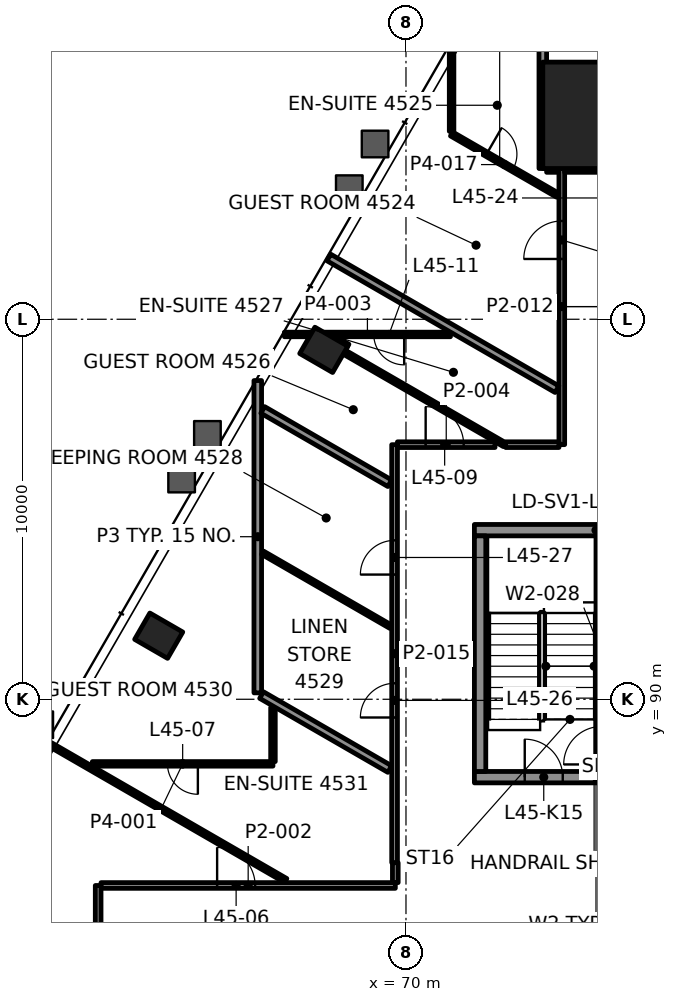
"""IFC4 building model, lengths in metres.
Left out: names, types, materials, properties, quantities, classifications, styles, units other than length and angle.
Written with IfcOpenShell. Run it as: python <this file> out.ifc"""

import sys

from ifc_helpers import new_model, si_unit, direction, frame, frame_2d, origin, origin_2d, place, context, subcontext, project, spatial, rectangle, hollow_rectangle, extrude, element, fill, save


model = new_model("IFC4")
c1 = context("Model", 3, precision=1e-05, world=origin(), true_north=direction((0.0, 1.0)))
c2 = subcontext(c1, "Body", "Model", "MODEL_VIEW")
j1 = project(units=[si_unit("LENGTHUNIT", "METRE"), si_unit("PLANEANGLEUNIT", "RADIAN")], contexts=[c1])
p1 = place(None, origin())
s1 = spatial("IfcSite", under=j1, at=p1, CompositionType="ELEMENT")
p2 = place(p1, origin())
s2 = spatial("IfcBuilding", under=s1, at=p2, CompositionType="ELEMENT")
p3 = place(p2, frame((0.0, 0.0, 194.8)))
s3 = spatial("IfcBuildingStorey", under=s2, at=p3, CompositionType="ELEMENT", Elevation=194.8)
p4 = place(p3, frame((75.0, 105.367, 0.0), z_axis=(0.0, 0.0, 1.0), x_axis=(-1.0, 0.0, 0.0)))
e1 = element("IfcColumn", 1, at=p4, inside=s3, PredefinedType="COLUMN", context=c2, shape_type="SweptSolid", body=[
    extrude(rectangle(XDim=2.8, YDim=2.8, at=origin_2d()), origin(), (0.0, 0.0, 1.0), 3.9),
])
for number, where, z_axis, x_axis in (
    (2, (67.836, 99.195, -0.0), (0.0, 0.0, 1.0), (-0.5, -0.866, 0.0)),
    (3, (63.494, 91.673, -0.0), (0.0, 0.0, 1.0), (-0.5, -0.866, 0.0)),
):
    element("IfcColumn", number, at=place(p3, frame(where, z_axis=z_axis, x_axis=x_axis)), inside=s3, PredefinedType="COLUMN", context=c2, shape_type="SweptSolid", body=[
        extrude(hollow_rectangle(XDim=0.8, YDim=1.0, WallThickness=0.05, at=origin_2d()), origin(), (0.0, 0.0, 1.0), 3.9),
    ])
p5 = place(p3, frame((71.8, 87.95, 0.0), z_axis=(0.0, 0.0, 1.0), x_axis=(1.0, 0.0, 0.0)))
e4 = element("IfcWall", 4, at=p5, inside=s3, PredefinedType="SHEAR", context=c2, shape_type="SweptSolid", body=[
    extrude(rectangle(XDim=6.4, YDim=0.3, at=frame_2d((3.2, 0.0))), origin(), (0.0, 0.0, 1.0), 3.7),
])
p6 = place(p5, frame((1.325, 0.0, 0.0)))
e5 = element("IfcOpeningElement", 5, at=p6, cuts=e4, PredefinedType="OPENING", context=c2, shape_type="SweptSolid", body=[
    extrude(rectangle(XDim=1.0, YDim=2.1, at=frame_2d((0.5, 1.05))), frame((0.0, 0.16, 0.0), z_axis=(0.0, -1.0, 0.0), x_axis=(1.0, 0.0, 0.0)), (0.0, 0.0, 1.0), 0.32),
])
p7 = place(p5, frame((4.125, 0.0, 0.0)))
e6 = element("IfcOpeningElement", 6, at=p7, cuts=e4, PredefinedType="OPENING", context=c2, shape_type="SweptSolid", body=[
    extrude(rectangle(XDim=1.2, YDim=2.1, at=frame_2d((0.6, 1.05))), frame((0.0, 0.16, 0.0), z_axis=(0.0, -1.0, 0.0), x_axis=(1.0, 0.0, 0.0)), (0.0, 0.0, 1.0), 0.32),
])
p8 = place(p3, frame((71.8, 94.45, 0.0), z_axis=(0.0, 0.0, 1.0), x_axis=(1.0, 0.0, 0.0)))
e7 = element("IfcWall", 7, at=p8, inside=s3, PredefinedType="SHEAR", context=c2, shape_type="SweptSolid", body=[
    extrude(rectangle(XDim=6.4, YDim=0.3, at=frame_2d((3.2, 0.0))), origin(), (0.0, 0.0, 1.0), 3.7),
])
p9 = place(p3, frame((71.95, 88.1, 0.0), z_axis=(0.0, 0.0, 1.0), x_axis=(0.0, 1.0, 0.0)))
e8 = element("IfcWall", 8, at=p9, inside=s3, PredefinedType="SHEAR", context=c2, shape_type="SweptSolid", body=[
    extrude(rectangle(XDim=6.2, YDim=0.3, at=frame_2d((3.1, 0.0))), origin(), (0.0, 0.0, 1.0), 3.7),
])
p10 = place(p3, frame((75.15, 88.1, 0.0), z_axis=(0.0, 0.0, 1.0), x_axis=(0.0, 1.0, 0.0)))
e9 = element("IfcWall", 9, at=p10, inside=s3, PredefinedType="SHEAR", context=c2, shape_type="SweptSolid", body=[
    extrude(rectangle(XDim=6.2, YDim=0.3, at=frame_2d((3.1, 0.0))), origin(), (0.0, 0.0, 1.0), 3.7),
])
p11 = place(p10, frame((0.185, 0.0, 0.0)))
e10 = element("IfcOpeningElement", 10, at=p11, cuts=e9, PredefinedType="OPENING", context=c2, shape_type="SweptSolid", body=[
    extrude(rectangle(XDim=1.0, YDim=2.1, at=frame_2d((0.5, 1.05))), frame((0.0, 0.16, 0.0), z_axis=(0.0, -1.0, 0.0), x_axis=(1.0, 0.0, 0.0)), (0.0, 0.0, 1.0), 0.32),
])
p12 = place(p3, frame((61.976, 85.1, 0.0), z_axis=(0.0, 0.0, 1.0), x_axis=(1.0, 0.0, 0.0)))
e11 = element("IfcWall", 11, at=p12, inside=s3, PredefinedType="PARTITIONING", context=c2, shape_type="SweptSolid", body=[
    extrude(rectangle(XDim=7.744, YDim=0.15, at=frame_2d((3.872, 0.0))), origin(), (0.0, 0.0, 1.0), 3.1),
])
p13 = place(p12, frame((3.055, 0.0, 0.0)))
e12 = element("IfcOpeningElement", 12, at=p13, cuts=e11, PredefinedType="OPENING", context=c2, shape_type="SweptSolid", body=[
    extrude(rectangle(XDim=1.0, YDim=2.1, at=frame_2d((0.5, 1.05))), frame((0.0, 0.085, 0.0), z_axis=(0.0, -1.0, 0.0), x_axis=(1.0, 0.0, 0.0)), (0.0, 0.0, 1.0), 0.17),
])
p14 = place(p3, frame((66.5, 88.3, 0.0), z_axis=(0.0, 0.0, 1.0), x_axis=(-1.0, 0.0, 0.0)))
e13 = element("IfcWall", 13, at=p14, inside=s3, PredefinedType="PARTITIONING", context=c2, shape_type="SweptSolid", body=[
    extrude(rectangle(XDim=4.751, YDim=0.12, at=frame_2d((2.376, 0.0))), origin(), (0.0, 0.0, 1.0), 3.097),
])
p15 = place(p14, frame((1.976, 0.0, 0.0)))
e14 = element("IfcOpeningElement", 14, at=p15, cuts=e13, PredefinedType="OPENING", context=c2, shape_type="SweptSolid", body=[
    extrude(rectangle(XDim=0.8, YDim=2.1, at=frame_2d((0.4, 1.05))), frame((0.0, 0.07, 0.0), z_axis=(0.0, -1.0, 0.0), x_axis=(1.0, 0.0, 0.0)), (0.0, 0.0, 1.0), 0.14),
])
p16 = place(p3, frame((69.775, 96.7, 0.0), z_axis=(0.0, 0.0, 1.0), x_axis=(1.0, 0.0, 0.0)))
e15 = element("IfcWall", 15, at=p16, inside=s3, PredefinedType="PARTITIONING", context=c2, shape_type="SweptSolid", body=[
    extrude(rectangle(XDim=2.567, YDim=0.15, at=frame_2d((1.284, 0.0))), origin(), (0.0, 0.0, 1.0), 3.1),
])
p17 = place(p16, frame((0.742, 0.0, 0.0)))
e16 = element("IfcOpeningElement", 16, at=p17, cuts=e15, PredefinedType="OPENING", context=c2, shape_type="SweptSolid", body=[
    extrude(rectangle(XDim=1.0, YDim=2.1, at=frame_2d((0.5, 1.05))), frame((0.0, 0.085, 0.0), z_axis=(0.0, -1.0, 0.0), x_axis=(1.0, 0.0, 0.0)), (0.0, 0.0, 1.0), 0.17),
])
p18 = place(p3, frame((71.17, 99.6, 0.0), z_axis=(0.0, 0.0, 1.0), x_axis=(-1.0, 0.0, 0.0)))
e17 = element("IfcWall", 17, at=p18, inside=s3, PredefinedType="PARTITIONING", context=c2, shape_type="SweptSolid", body=[
    extrude(rectangle(XDim=4.37, YDim=0.12, at=frame_2d((2.185, 0.0))), origin(), (0.0, 0.0, 1.0), 3.1),
])
p19 = place(p18, frame((1.218, 0.0, 0.0)))
e18 = element("IfcOpeningElement", 18, at=p19, cuts=e17, PredefinedType="OPENING", context=c2, shape_type="SweptSolid", body=[
    extrude(rectangle(XDim=0.8, YDim=2.1, at=frame_2d((0.4, 1.05))), frame((0.0, 0.07, 0.0), z_axis=(0.0, -1.0, 0.0), x_axis=(1.0, 0.0, 0.0)), (0.0, 0.0, 1.0), 0.14),
])
p20 = place(p3, frame((73.7, 103.967, 0.0), z_axis=(0.0, 0.0, 1.0), x_axis=(1.0, 0.0, 0.0)))
e19 = element("IfcWall", 19, at=p20, inside=s3, PredefinedType="PARTITIONING", context=c2, shape_type="SweptSolid", body=[
    extrude(rectangle(XDim=0.324, YDim=0.2, at=frame_2d((0.162, 0.0))), origin(), (0.0, 0.0, 1.0), 3.1),
])
p21 = place(p3, frame((74.1, 96.7, 0.0), z_axis=(0.0, 0.0, 1.0), x_axis=(0.0, 1.0, 0.0)))
e20 = element("IfcWall", 20, at=p21, inside=s3, PredefinedType="PARTITIONING", context=c2, shape_type="SweptSolid", body=[
    extrude(rectangle(XDim=7.267, YDim=0.15, at=frame_2d((3.633, 0.0))), origin(), (0.0, 0.0, 1.0), 3.1),
])
p22 = place(p21, frame((4.886, 0.0, 0.0)))
e21 = element("IfcOpeningElement", 21, at=p22, cuts=e20, PredefinedType="OPENING", context=c2, shape_type="SweptSolid", body=[
    extrude(rectangle(XDim=1.0, YDim=2.1, at=frame_2d((0.5, 1.05))), frame((0.0, 0.085, 0.0), z_axis=(0.0, -1.0, 0.0), x_axis=(1.0, 0.0, 0.0)), (0.0, 0.0, 1.0), 0.17),
])
p23 = place(p3, frame((73.6, 103.967, 0.0), z_axis=(0.0, 0.0, 1.0), x_axis=(0.0, 1.0, 0.0)))
e22 = element("IfcWall", 22, at=p23, inside=s3, PredefinedType="PARTITIONING", context=c2, shape_type="SweptSolid", body=[
    extrude(rectangle(XDim=3.26, YDim=0.2, at=frame_2d((1.63, 0.0))), origin(), (0.0, 0.0, 1.0), 3.1),
])
p24 = place(p3, frame((71.2, 104.945, 0.0), z_axis=(0.0, 0.0, 1.0), x_axis=(0.0, 1.0, 0.0)))
e23 = element("IfcWall", 23, at=p24, inside=s3, PredefinedType="PARTITIONING", context=c2, shape_type="SweptSolid", body=[
    extrude(rectangle(XDim=2.252, YDim=0.12, at=frame_2d((1.126, 0.0))), origin(), (0.0, 0.0, 1.0), 3.1),
])
p25 = place(p3, frame((69.719, 85.175, 0.0), z_axis=(0.0, 0.0, 1.0), x_axis=(0.0, 1.0, 0.0)))
e24 = element("IfcWall", 24, at=p25, inside=s3, PredefinedType="PARTITIONING", context=c2, shape_type="SweptSolid", body=[
    extrude(rectangle(XDim=0.525, YDim=0.15, at=frame_2d((0.262, 0.0))), origin(), (0.0, 0.0, 1.0), 3.1),
])
p26 = place(p3, frame((69.7, 85.7, 0.0), z_axis=(0.0, 0.0, 1.0), x_axis=(0.0, 1.0, 0.0)))
e25 = element("IfcWall", 25, at=p26, inside=s3, PredefinedType="PARTITIONING", context=c2, shape_type="SweptSolid", body=[
    extrude(rectangle(XDim=10.999, YDim=0.15, at=frame_2d((5.5, 0.0))), origin(), (0.0, 0.0, 1.0), 3.097),
])
p27 = place(p26, frame((3.82, 0.0, 0.0)))
e26 = element("IfcOpeningElement", 26, at=p27, cuts=e25, PredefinedType="OPENING", context=c2, shape_type="SweptSolid", body=[
    extrude(rectangle(XDim=0.9, YDim=2.1, at=frame_2d((0.45, 1.05))), frame((0.0, 0.085, 0.0), z_axis=(0.0, -1.0, 0.0), x_axis=(1.0, 0.0, 0.0)), (0.0, 0.0, 1.0), 0.17),
])
p28 = place(p26, frame((7.581, 0.0, 0.0)))
e27 = element("IfcOpeningElement", 27, at=p28, cuts=e25, PredefinedType="OPENING", context=c2, shape_type="SweptSolid", body=[
    extrude(rectangle(XDim=0.9, YDim=2.1, at=frame_2d((0.45, 1.05))), frame((0.0, 0.085, 0.0), z_axis=(0.0, -1.0, 0.0), x_axis=(1.0, 0.0, 0.0)), (0.0, 0.0, 1.0), 0.17),
])
p29 = place(p3, frame((66.5, 88.361, 0.0), z_axis=(0.0, 0.0, 1.0), x_axis=(0.0, 1.0, 0.0)))
e28 = element("IfcWall", 28, at=p29, inside=s3, PredefinedType="PARTITIONING", context=c2, shape_type="SweptSolid", body=[
    extrude(rectangle(XDim=1.421, YDim=0.12, at=frame_2d((0.71, 0.0))), origin(), (0.0, 0.0, 1.0), 3.1),
])
p30 = place(p3, frame((66.1, 90.169, 0.0), z_axis=(0.0, 0.0, 1.0), x_axis=(0.0, 1.0, 0.0)))
e29 = element("IfcWall", 29, at=p30, inside=s3, PredefinedType="PARTITIONING", context=c2, shape_type="SweptSolid", body=[
    extrude(rectangle(XDim=8.218, YDim=0.2, at=frame_2d((4.109, 0.0))), origin(), (0.0, 0.0, 1.0), 3.022),
])
p31 = place(p3, frame((61.9, 68.476, 0.0), z_axis=(0.0, 0.0, 1.0), x_axis=(0.0, 1.0, 0.0)))
e30 = element("IfcWall", 30, at=p31, inside=s3, PredefinedType="PARTITIONING", context=c2, shape_type="SweptSolid", body=[
    extrude(rectangle(XDim=16.624, YDim=0.15, at=frame_2d((8.312, 0.0))), origin(), (0.0, 0.0, 1.0), 3.1),
])
p32 = place(p31, frame((8.276, 0.0, 0.0)))
e31 = element("IfcOpeningElement", 31, at=p32, cuts=e30, PredefinedType="OPENING", context=c2, shape_type="SweptSolid", body=[
    extrude(rectangle(XDim=1.0, YDim=2.1, at=frame_2d((0.5, 1.05))), frame((0.0, 0.085, 0.0), z_axis=(0.0, -1.0, 0.0), x_axis=(1.0, 0.0, 0.0)), (0.0, 0.0, 1.0), 0.17),
])
p33 = place(p3, frame((71.2, 104.876, 0.0), z_axis=(0.0, 0.0, 1.0), x_axis=(0.866029130051, -0.499993545862, 0.0)))
e32 = element("IfcWall", 32, at=p33, inside=s3, PredefinedType="PARTITIONING", context=c2, shape_type="SweptSolid", body=[
    extrude(rectangle(XDim=3.222, YDim=0.12, at=frame_2d((1.611, 0.0))), origin(), (0.0, 0.0, 1.0), 3.1),
])
p34 = place(p33, frame((1.061, 0.0, 0.0)))
e33 = element("IfcOpeningElement", 33, at=p34, cuts=e32, PredefinedType="OPENING", context=c2, shape_type="SweptSolid", body=[
    extrude(rectangle(XDim=0.8, YDim=2.1, at=frame_2d((0.4, 1.05))), frame((0.0, 0.07, 0.0), z_axis=(0.0, -1.0, 0.0), x_axis=(1.0, 0.0, 0.0)), (0.0, 0.0, 1.0), 0.14),
])
p35 = place(p3, frame((73.973, 98.159, 0.0), z_axis=(0.0, 0.0, 1.0), x_axis=(-0.866026061359, 0.499998861046, 0.0)))
e34 = element("IfcWall", 34, at=p35, inside=s3, PredefinedType="PARTITIONING", context=c2, shape_type="SweptSolid", body=[
    extrude(rectangle(XDim=6.932, YDim=0.2, at=frame_2d((3.466, 0.0))), origin(), (0.0, 0.0, 1.0), 3.1),
])
p36 = place(p3, frame((68.469, 99.291, 0.0), z_axis=(0.0, 0.0, 1.0), x_axis=(-0.865986299303, 0.500067724834, 0.0)))
e35 = element("IfcWall", 35, at=p36, inside=s3, PredefinedType="PARTITIONING", context=c2, shape_type="SweptSolid", body=[
    extrude(rectangle(XDim=0.388, YDim=0.12, at=frame_2d((0.194, 0.0))), origin(), (0.0, 0.0, 1.0), 3.1),
])
p37 = place(p3, frame((72.592, 96.7, 0.0), z_axis=(0.0, 0.0, 1.0), x_axis=(-0.866036013313, 0.499981623307, 0.0)))
e36 = element("IfcWall", 36, at=p37, inside=s3, PredefinedType="PARTITIONING", context=c2, shape_type="SweptSolid", body=[
    extrude(rectangle(XDim=4.865, YDim=0.12, at=frame_2d((2.433, 0.0))), origin(), (0.0, 0.0, 1.0), 3.1),
])
p38 = place(p3, frame((69.573, 95.685, 0.0), z_axis=(0.0, 0.0, 1.0), x_axis=(-0.8660191159, 0.500010890777, 0.0)))
e37 = element("IfcWall", 37, at=p38, inside=s3, PredefinedType="PARTITIONING", context=c2, shape_type="SweptSolid", body=[
    extrude(rectangle(XDim=3.859, YDim=0.2, at=frame_2d((1.929, 0.0))), origin(), (0.0, 0.0, 1.0), 3.022),
])
p39 = place(p3, frame((69.599, 91.909, 0.0), z_axis=(0.0, 0.0, 1.0), x_axis=(-0.866016482536, 0.500015451737, 0.0)))
e38 = element("IfcWall", 38, at=p39, inside=s3, PredefinedType="PARTITIONING", context=c2, shape_type="SweptSolid", body=[
    extrude(rectangle(XDim=3.895, YDim=0.1, at=frame_2d((1.948, 0.0))), origin(), (0.0, 0.0, 1.0), 3.1),
])
p40 = place(p3, frame((69.573, 88.163, 0.0), z_axis=(0.0, 0.0, 1.0), x_axis=(-0.866043624834, 0.499968438888, 0.0)))
e39 = element("IfcWall", 39, at=p40, inside=s3, PredefinedType="PARTITIONING", context=c2, shape_type="SweptSolid", body=[
    extrude(rectangle(XDim=3.895, YDim=0.2, at=frame_2d((1.947, 0.0))), origin(), (0.0, 0.0, 1.0), 3.1),
])
p41 = place(p3, frame((66.835, 85.23, 0.0), z_axis=(0.0, 0.0, 1.0), x_axis=(-0.866029508188, 0.499992890897, 0.0)))
e40 = element("IfcWall", 40, at=p41, inside=s3, PredefinedType="PARTITIONING", context=c2, shape_type="SweptSolid", body=[
    extrude(rectangle(XDim=7.215, YDim=0.12, at=frame_2d((3.608, 0.0))), origin(), (0.0, 0.0, 1.0), 3.022),
])
p42 = place(p3, frame((72.622, 96.7, 0.0), z_axis=(0.0, 0.0, 1.0), x_axis=(1.0, 0.0, 0.0)))
e41 = element("IfcWall", 41, at=p42, inside=s3, PredefinedType="PARTITIONING", context=c2, shape_type="SweptSolid", body=[
    extrude(rectangle(XDim=1.403, YDim=0.15, at=frame_2d((0.701, 0.0))), origin(), (0.0, 0.0, 1.0), 3.1),
])
p43 = place(p3, frame((74.175, 103.967, 0.0), z_axis=(0.0, 0.0, 1.0), x_axis=(1.0, 0.0, 0.0)))
e42 = element("IfcWall", 42, at=p43, inside=s3, PredefinedType="PARTITIONING", context=c2, shape_type="SweptSolid", body=[
    extrude(rectangle(XDim=1.649, YDim=0.2, at=frame_2d((0.825, 0.0))), origin(), (0.0, 0.0, 1.0), 3.097),
])
p44 = place(p13, origin())
e43 = element("IfcDoor", 43, at=p44, inside=s3, OperationType="SINGLE_SWING_LEFT", PredefinedType="DOOR", context=c2, shape_type="SweptSolid", body=[
    extrude(rectangle(XDim=1.0, YDim=2.1, at=frame_2d((0.5, 1.05))), frame((0.0, 0.025, 0.0), z_axis=(0.0, -1.0, 0.0), x_axis=(1.0, 0.0, 0.0)), (0.0, 0.0, 1.0), 0.05),
])
fill(e12, e43)
p45 = place(p15, origin())
e44 = element("IfcDoor", 44, at=p45, inside=s3, OperationType="SINGLE_SWING_LEFT", PredefinedType="DOOR", context=c2, shape_type="SweptSolid", body=[
    extrude(rectangle(XDim=0.8, YDim=2.1, at=frame_2d((0.4, 1.05))), frame((0.0, 0.025, 0.0), z_axis=(0.0, -1.0, 0.0), x_axis=(1.0, 0.0, 0.0)), (0.0, 0.0, 1.0), 0.05),
])
fill(e14, e44)
p46 = place(p17, origin())
e45 = element("IfcDoor", 45, at=p46, inside=s3, OperationType="SINGLE_SWING_LEFT", PredefinedType="DOOR", context=c2, shape_type="SweptSolid", body=[
    extrude(rectangle(XDim=1.0, YDim=2.1, at=frame_2d((0.5, 1.05))), frame((0.0, 0.025, 0.0), z_axis=(0.0, -1.0, 0.0), x_axis=(1.0, 0.0, 0.0)), (0.0, 0.0, 1.0), 0.05),
])
fill(e16, e45)
p47 = place(p19, origin())
e46 = element("IfcDoor", 46, at=p47, inside=s3, OperationType="SINGLE_SWING_LEFT", PredefinedType="DOOR", context=c2, shape_type="SweptSolid", body=[
    extrude(rectangle(XDim=0.8, YDim=2.1, at=frame_2d((0.4, 1.05))), frame((0.0, 0.025, 0.0), z_axis=(0.0, -1.0, 0.0), x_axis=(1.0, 0.0, 0.0)), (0.0, 0.0, 1.0), 0.05),
])
fill(e18, e46)
p48 = place(p22, origin())
e47 = element("IfcDoor", 47, at=p48, inside=s3, OperationType="SINGLE_SWING_LEFT", PredefinedType="DOOR", context=c2, shape_type="SweptSolid", body=[
    extrude(rectangle(XDim=1.0, YDim=2.1, at=frame_2d((0.5, 1.05))), frame((0.0, 0.025, 0.0), z_axis=(0.0, -1.0, 0.0), x_axis=(1.0, 0.0, 0.0)), (0.0, 0.0, 1.0), 0.05),
])
fill(e21, e47)
p49 = place(p27, origin())
e48 = element("IfcDoor", 48, at=p49, inside=s3, OperationType="SINGLE_SWING_RIGHT", PredefinedType="DOOR", context=c2, shape_type="SweptSolid", body=[
    extrude(rectangle(XDim=0.9, YDim=2.1, at=frame_2d((0.45, 1.05))), frame((0.0, 0.025, 0.0), z_axis=(0.0, -1.0, 0.0), x_axis=(1.0, 0.0, 0.0)), (0.0, 0.0, 1.0), 0.05),
])
fill(e26, e48)
p50 = place(p28, origin())
e49 = element("IfcDoor", 49, at=p50, inside=s3, OperationType="SINGLE_SWING_LEFT", PredefinedType="DOOR", context=c2, shape_type="SweptSolid", body=[
    extrude(rectangle(XDim=0.9, YDim=2.1, at=frame_2d((0.45, 1.05))), frame((0.0, 0.025, 0.0), z_axis=(0.0, -1.0, 0.0), x_axis=(1.0, 0.0, 0.0)), (0.0, 0.0, 1.0), 0.05),
])
fill(e27, e49)
p51 = place(p34, origin())
e50 = element("IfcDoor", 50, at=p51, inside=s3, OperationType="SINGLE_SWING_LEFT", PredefinedType="DOOR", context=c2, shape_type="SweptSolid", body=[
    extrude(rectangle(XDim=0.8, YDim=2.1, at=frame_2d((0.4, 1.05))), frame((0.0, 0.025, 0.0), z_axis=(0.0, -1.0, 0.0), x_axis=(1.0, 0.0, 0.0)), (0.0, 0.0, 1.0), 0.05),
])
fill(e33, e50)
p52 = place(p6, origin())
e51 = element("IfcDoor", 51, at=p52, inside=s3, OperationType="SINGLE_SWING_RIGHT", PredefinedType="DOOR", context=c2, shape_type="SweptSolid", body=[
    extrude(rectangle(XDim=1.0, YDim=2.1, at=frame_2d((0.5, 1.05))), frame((0.0, 0.025, 0.0), z_axis=(0.0, -1.0, 0.0), x_axis=(1.0, 0.0, 0.0)), (0.0, 0.0, 1.0), 0.05),
])
fill(e5, e51)
save(model, sys.argv[1])
